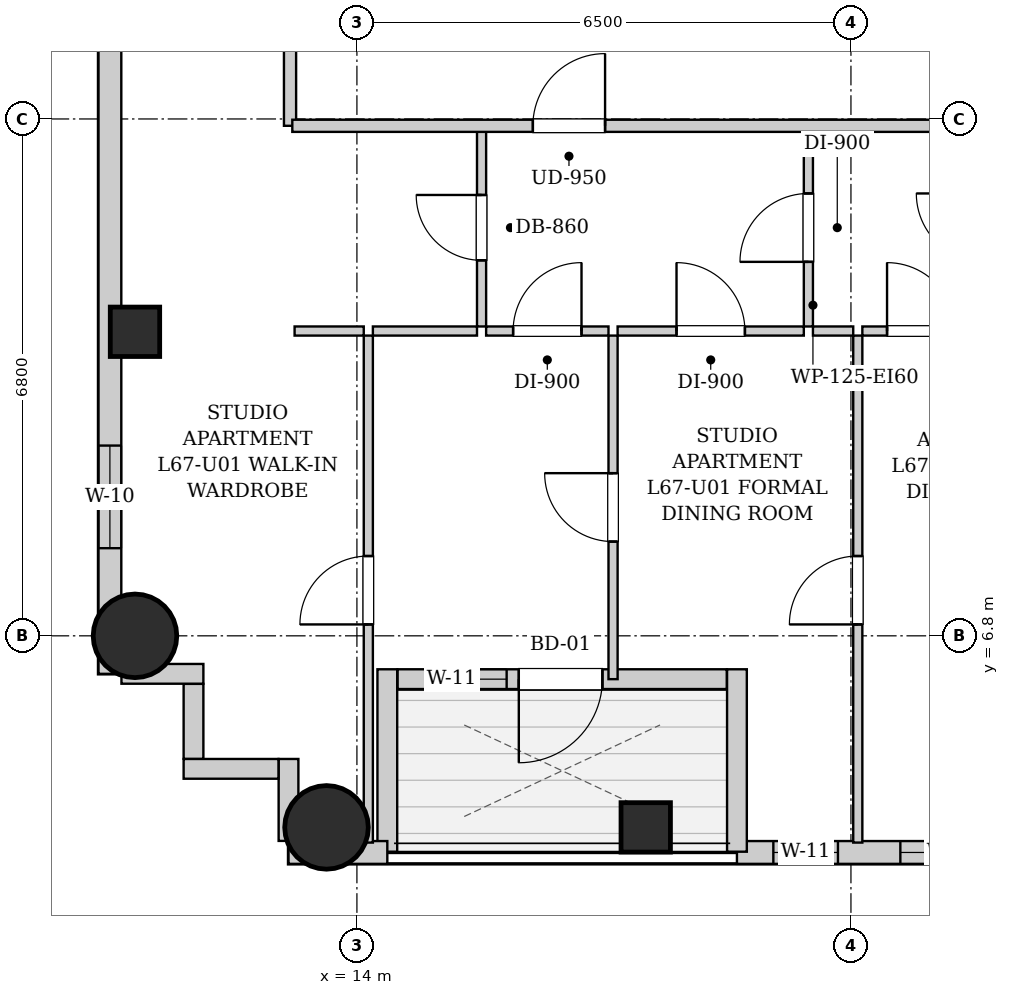
"""IFC4 building model, lengths in metres.
Left out: names, types, materials, properties, quantities, classifications, styles, units other than length and angle.
Written with IfcOpenShell. Run it as: python <this file> out.ifc"""

import sys

from ifc_helpers import new_model, si_unit, direction, frame, frame_2d, origin, origin_2d, place, context, subcontext, project, spatial, rectangle, circle, extrude, element, fill, save


model = new_model("IFC4")
c1 = context("Model", 3, precision=1e-05, world=origin(), true_north=direction((0.0, 1.0)))
c2 = subcontext(c1, "Body", "Model", "MODEL_VIEW")
j1 = project(units=[si_unit("LENGTHUNIT", "METRE"), si_unit("PLANEANGLEUNIT", "RADIAN")], contexts=[c1])
p1 = place(None, origin())
s1 = spatial("IfcSite", under=j1, at=p1, CompositionType="ELEMENT")
p2 = place(p1, origin())
s2 = spatial("IfcBuilding", under=s1, at=p2, CompositionType="ELEMENT")
p3 = place(p2, frame((0.0, 0.0, 230.9)))
s3 = spatial("IfcBuildingStorey", under=s2, at=p3, CompositionType="ELEMENT", Elevation=230.9)
p4 = place(p3, frame((13.6, 4.28, 0.0), z_axis=(0.0, 0.0, 1.0), x_axis=(1.0, 0.0, 0.0)))
e1 = element("IfcColumn", 1, at=p4, inside=s3, PredefinedType="COLUMN", context=c2, shape_type="SweptSolid", body=[
    extrude(circle(Radius=0.55, at=origin_2d()), origin(), (0.0, 0.0, 1.0), 3.4),
])
p5 = place(p3, frame((17.8, 4.28, 0.0), z_axis=(0.0, 0.0, 1.0), x_axis=(1.0, 0.0, 0.0)))
e2 = element("IfcColumn", 2, at=p5, inside=s3, PredefinedType="COLUMN", context=c2, shape_type="SweptSolid", body=[
    extrude(rectangle(XDim=0.65, YDim=0.65, at=origin_2d()), origin(), (0.0, 0.0, 1.0), 3.4),
])
p6 = place(p3, frame((11.08, 6.8, 0.0), z_axis=(0.0, 0.0, 1.0), x_axis=(1.0, 0.0, 0.0)))
e3 = element("IfcColumn", 3, at=p6, inside=s3, PredefinedType="COLUMN", context=c2, shape_type="SweptSolid", body=[
    extrude(circle(Radius=0.55, at=origin_2d()), origin(), (0.0, 0.0, 1.0), 3.4),
])
p7 = place(p3, frame((11.08, 10.8, 0.0), z_axis=(0.0, 0.0, 1.0), x_axis=(1.0, 0.0, 0.0)))
e4 = element("IfcColumn", 4, at=p7, inside=s3, PredefinedType="COLUMN", context=c2, shape_type="SweptSolid", body=[
    extrude(rectangle(XDim=0.65, YDim=0.65, at=origin_2d()), origin(), (0.0, 0.0, 1.0), 3.4),
])
p8 = place(p3, frame((31.5, 3.95, 0.0), z_axis=(0.0, 0.0, 1.0), x_axis=(-1.0, 0.0, 0.0)))
e5 = element("IfcWall", 5, at=p8, inside=s3, PredefinedType="SOLIDWALL", context=c2, shape_type="SweptSolid", body=[
    extrude(rectangle(XDim=12.5, YDim=0.3, at=frame_2d((6.25, 0.0))), origin(), (0.0, 0.0, 1.0), 3.14),
])
p9 = place(p8, frame((11.171, 0.0, 0.55)))
e6 = element("IfcOpeningElement", 6, at=p9, cuts=e5, PredefinedType="OPENING", context=c2, shape_type="SweptSolid", body=[
    extrude(rectangle(XDim=0.85, YDim=1.2, at=frame_2d((0.425, 0.6))), frame((0.0, 0.16, 0.0), z_axis=(0.0, -1.0, 0.0), x_axis=(1.0, 0.0, 0.0)), (0.0, 0.0, 1.0), 0.32),
])
p10 = place(p8, frame((9.0, 0.0, 0.55)))
e7 = element("IfcOpeningElement", 7, at=p10, cuts=e5, PredefinedType="OPENING", context=c2, shape_type="SweptSolid", body=[
    extrude(rectangle(XDim=1.35, YDim=1.2, at=frame_2d((0.675, 0.6))), frame((0.0, 0.16, 0.0), z_axis=(0.0, -1.0, 0.0), x_axis=(1.0, 0.0, 0.0)), (0.0, 0.0, 1.0), 0.32),
])
p11 = place(p8, frame((2.186, 0.0, 0.55)))
e8 = element("IfcOpeningElement", 8, at=p11, cuts=e5, PredefinedType="OPENING", context=c2, shape_type="SweptSolid", body=[
    extrude(rectangle(XDim=1.35, YDim=1.2, at=frame_2d((0.675, 0.6))), frame((0.0, 0.16, 0.0), z_axis=(0.0, -1.0, 0.0), x_axis=(1.0, 0.0, 0.0)), (0.0, 0.0, 1.0), 0.32),
])
p12 = place(p8, frame((0.35, 0.0, 0.55)))
e9 = element("IfcOpeningElement", 9, at=p12, cuts=e5, PredefinedType="OPENING", context=c2, shape_type="SweptSolid", body=[
    extrude(rectangle(XDim=0.68, YDim=1.2, at=frame_2d((0.34, 0.6))), frame((0.0, 0.16, 0.0), z_axis=(0.0, -1.0, 0.0), x_axis=(1.0, 0.0, 0.0)), (0.0, 0.0, 1.0), 0.32),
])
p13 = place(p3, frame((19.0, 3.96, 0.0), z_axis=(0.0, 0.0, 1.0), x_axis=(0.0, 1.0, 0.0)))
e10 = element("IfcWall", 10, at=p13, inside=s3, PredefinedType="SOLIDWALL", context=c2, shape_type="SweptSolid", body=[
    extrude(rectangle(XDim=2.4, YDim=0.26, at=frame_2d((1.2, 0.0))), origin(), (0.0, 0.0, 1.0), 3.14),
])
p14 = place(p3, frame((18.866, 6.23, 0.0), z_axis=(0.0, 0.0, 1.0), x_axis=(-1.0, 0.0, 0.0)))
e11 = element("IfcWall", 11, at=p14, inside=s3, PredefinedType="SOLIDWALL", context=c2, shape_type="SweptSolid", body=[
    extrude(rectangle(XDim=4.332, YDim=0.26, at=frame_2d((2.166, 0.0))), origin(), (0.0, 0.0, 1.0), 3.14),
])
p15 = place(p14, frame((1.636, 0.0, 0.0)))
e12 = element("IfcOpeningElement", 12, at=p15, cuts=e11, PredefinedType="OPENING", context=c2, shape_type="SweptSolid", body=[
    extrude(rectangle(XDim=1.1, YDim=2.0, at=frame_2d((0.55, 1.0))), frame((0.0, 0.14, 0.0), z_axis=(0.0, -1.0, 0.0), x_axis=(1.0, 0.0, 0.0)), (0.0, 0.0, 1.0), 0.28),
])
p16 = place(p14, frame((2.896, 0.0, 0.55)))
e13 = element("IfcOpeningElement", 13, at=p16, cuts=e11, PredefinedType="OPENING", context=c2, shape_type="SweptSolid", body=[
    extrude(rectangle(XDim=0.85, YDim=1.2, at=frame_2d((0.425, 0.6))), frame((0.0, 0.14, 0.0), z_axis=(0.0, -1.0, 0.0), x_axis=(1.0, 0.0, 0.0)), (0.0, 0.0, 1.0), 0.28),
])
p17 = place(p3, frame((14.4, 6.36, 0.0), z_axis=(0.0, 0.0, 1.0), x_axis=(0.0, -1.0, 0.0)))
e14 = element("IfcWall", 14, at=p17, inside=s3, PredefinedType="SOLIDWALL", context=c2, shape_type="SweptSolid", body=[
    extrude(rectangle(XDim=2.4, YDim=0.26, at=frame_2d((1.2, 0.0))), origin(), (0.0, 0.0, 1.0), 3.14),
])
p18 = place(p3, frame((14.4, 3.95, 0.0), z_axis=(0.0, 0.0, 1.0), x_axis=(-1.0, 0.0, 0.0)))
e15 = element("IfcWall", 15, at=p18, inside=s3, PredefinedType="SOLIDWALL", context=c2, shape_type="SweptSolid", body=[
    extrude(rectangle(XDim=1.3, YDim=0.3, at=frame_2d((0.65, 0.0))), origin(), (0.0, 0.0, 1.0), 3.14),
])
p19 = place(p3, frame((10.75, 6.3, 0.0), z_axis=(0.0, 0.0, 1.0), x_axis=(0.0, 1.0, 0.0)))
e16 = element("IfcWall", 16, at=p19, inside=s3, PredefinedType="SOLIDWALL", context=c2, shape_type="SweptSolid", body=[
    extrude(rectangle(XDim=31.4, YDim=0.3, at=frame_2d((15.7, 0.0))), origin(), (0.0, 0.0, 1.0), 3.14),
])
p20 = place(p19, frame((1.653, 0.0, 0.55)))
e17 = element("IfcOpeningElement", 17, at=p20, cuts=e16, PredefinedType="OPENING", context=c2, shape_type="SweptSolid", body=[
    extrude(rectangle(XDim=1.35, YDim=1.2, at=frame_2d((0.675, 0.6))), frame((0.0, 0.16, 0.0), z_axis=(0.0, -1.0, 0.0), x_axis=(1.0, 0.0, 0.0)), (0.0, 0.0, 1.0), 0.32),
])
p21 = place(p19, frame((10.367, 0.0, 0.55)))
e18 = element("IfcOpeningElement", 18, at=p21, cuts=e16, PredefinedType="OPENING", context=c2, shape_type="SweptSolid", body=[
    extrude(rectangle(XDim=1.35, YDim=1.2, at=frame_2d((0.675, 0.6))), frame((0.0, 0.16, 0.0), z_axis=(0.0, -1.0, 0.0), x_axis=(1.0, 0.0, 0.0)), (0.0, 0.0, 1.0), 0.32),
])
p22 = place(p19, frame((19.683, 0.0, 0.55)))
e19 = element("IfcOpeningElement", 19, at=p22, cuts=e16, PredefinedType="OPENING", context=c2, shape_type="SweptSolid", body=[
    extrude(rectangle(XDim=1.35, YDim=1.2, at=frame_2d((0.675, 0.6))), frame((0.0, 0.16, 0.0), z_axis=(0.0, -1.0, 0.0), x_axis=(1.0, 0.0, 0.0)), (0.0, 0.0, 1.0), 0.32),
])
p23 = place(p3, frame((13.1, 4.102, 0.0), z_axis=(0.0, 0.0, 1.0), x_axis=(0.0, 1.0, 0.0)))
e20 = element("IfcWall", 20, at=p23, inside=s3, PredefinedType="SOLIDWALL", context=c2, shape_type="SweptSolid", body=[
    extrude(rectangle(XDim=1.078, YDim=0.26, at=frame_2d((0.539, 0.0))), origin(), (0.0, 0.0, 1.0), 3.14),
])
p24 = place(p3, frame((12.968, 5.05, 0.0), z_axis=(0.0, 0.0, 1.0), x_axis=(-1.0, 0.0, 0.0)))
e21 = element("IfcWall", 21, at=p24, inside=s3, PredefinedType="SOLIDWALL", context=c2, shape_type="SweptSolid", body=[
    extrude(rectangle(XDim=1.248, YDim=0.26, at=frame_2d((0.624, 0.0))), origin(), (0.0, 0.0, 1.0), 3.14),
])
p25 = place(p3, frame((11.85, 5.182, 0.0), z_axis=(0.0, 0.0, 1.0), x_axis=(0.0, 1.0, 0.0)))
e22 = element("IfcWall", 22, at=p25, inside=s3, PredefinedType="SOLIDWALL", context=c2, shape_type="SweptSolid", body=[
    extrude(rectangle(XDim=0.986, YDim=0.26, at=frame_2d((0.493, 0.0))), origin(), (0.0, 0.0, 1.0), 3.14),
])
p26 = place(p3, frame((11.98, 6.3, 0.0), z_axis=(0.0, 0.0, 1.0), x_axis=(-1.0, 0.0, 0.0)))
e23 = element("IfcWall", 23, at=p26, inside=s3, PredefinedType="SOLIDWALL", context=c2, shape_type="SweptSolid", body=[
    extrude(rectangle(XDim=1.078, YDim=0.26, at=frame_2d((0.539, 0.0))), origin(), (0.0, 0.0, 1.0), 3.14),
])
p27 = place(p3, frame((13.12, 13.51, 0.0), z_axis=(0.0, 0.0, 1.0), x_axis=(0.0, 1.0, 0.0)))
e24 = element("IfcWall", 24, at=p27, inside=s3, PredefinedType="PARTITIONING", context=c2, shape_type="SweptSolid", body=[
    extrude(rectangle(XDim=1.58, YDim=0.16, at=frame_2d((0.79, 0.0))), origin(), (0.0, 0.0, 1.0), 3.14),
])
p28 = place(p3, frame((15.64, 10.87, 0.0), z_axis=(0.0, 0.0, 1.0), x_axis=(0.0, 1.0, 0.0)))
e25 = element("IfcWall", 25, at=p28, inside=s3, PredefinedType="PARTITIONING", context=c2, shape_type="SweptSolid", body=[
    extrude(rectangle(XDim=2.6, YDim=0.12, at=frame_2d((1.3, 0.0))), origin(), (0.0, 0.0, 1.0), 3.14),
])
p29 = place(p28, frame((0.87, 0.0, 0.0)))
e26 = element("IfcOpeningElement", 26, at=p29, cuts=e25, PredefinedType="OPENING", context=c2, shape_type="SweptSolid", body=[
    extrude(rectangle(XDim=0.86, YDim=2.05, at=frame_2d((0.43, 1.025))), frame((0.0, 0.07, 0.0), z_axis=(0.0, -1.0, 0.0), x_axis=(1.0, 0.0, 0.0)), (0.0, 0.0, 1.0), 0.14),
])
p30 = place(p3, frame((13.18, 10.81, 0.0), z_axis=(0.0, 0.0, 1.0), x_axis=(1.0, 0.0, 0.0)))
e27 = element("IfcWall", 27, at=p30, inside=s3, PredefinedType="PARTITIONING", context=c2, shape_type="SweptSolid", body=[
    extrude(rectangle(XDim=0.91, YDim=0.12, at=frame_2d((0.455, 0.0))), origin(), (0.0, 0.0, 1.0), 3.14),
])
p31 = place(p3, frame((14.21, 10.81, 0.0), z_axis=(0.0, 0.0, 1.0), x_axis=(1.0, 0.0, 0.0)))
e28 = element("IfcWall", 28, at=p31, inside=s3, PredefinedType="PARTITIONING", context=c2, shape_type="SweptSolid", body=[
    extrude(rectangle(XDim=1.37, YDim=0.12, at=frame_2d((0.685, 0.0))), origin(), (0.0, 0.0, 1.0), 3.14),
])
p32 = place(p3, frame((19.94, 10.87, 0.0), z_axis=(0.0, 0.0, 1.0), x_axis=(0.0, 1.0, 0.0)))
e29 = element("IfcWall", 29, at=p32, inside=s3, PredefinedType="PARTITIONING", context=c2, shape_type="SweptSolid", body=[
    extrude(rectangle(XDim=2.6, YDim=0.12, at=frame_2d((1.3, 0.0))), origin(), (0.0, 0.0, 1.0), 3.14),
])
p33 = place(p32, frame((0.85, 0.0, 0.0)))
e30 = element("IfcOpeningElement", 30, at=p33, cuts=e29, PredefinedType="OPENING", context=c2, shape_type="SweptSolid", body=[
    extrude(rectangle(XDim=0.9, YDim=2.05, at=frame_2d((0.45, 1.025))), frame((0.0, 0.07, 0.0), z_axis=(0.0, -1.0, 0.0), x_axis=(1.0, 0.0, 0.0)), (0.0, 0.0, 1.0), 0.14),
])
p34 = place(p3, frame((15.7, 10.81, 0.0), z_axis=(0.0, 0.0, 1.0), x_axis=(1.0, 0.0, 0.0)))
e31 = element("IfcWall", 31, at=p34, inside=s3, PredefinedType="PARTITIONING", context=c2, shape_type="SweptSolid", body=[
    extrude(rectangle(XDim=1.61, YDim=0.12, at=frame_2d((0.805, 0.0))), origin(), (0.0, 0.0, 1.0), 3.14),
])
p35 = place(p34, frame((0.355, 0.0, 0.0)))
e32 = element("IfcOpeningElement", 32, at=p35, cuts=e31, PredefinedType="OPENING", context=c2, shape_type="SweptSolid", body=[
    extrude(rectangle(XDim=0.9, YDim=2.05, at=frame_2d((0.45, 1.025))), frame((0.0, 0.07, 0.0), z_axis=(0.0, -1.0, 0.0), x_axis=(1.0, 0.0, 0.0)), (0.0, 0.0, 1.0), 0.14),
])
p36 = place(p3, frame((17.43, 10.81, 0.0), z_axis=(0.0, 0.0, 1.0), x_axis=(1.0, 0.0, 0.0)))
e33 = element("IfcWall", 33, at=p36, inside=s3, PredefinedType="PARTITIONING", context=c2, shape_type="SweptSolid", body=[
    extrude(rectangle(XDim=2.45, YDim=0.12, at=frame_2d((1.225, 0.0))), origin(), (0.0, 0.0, 1.0), 3.14),
])
p37 = place(p36, frame((0.775, 0.0, 0.0)))
e34 = element("IfcOpeningElement", 34, at=p37, cuts=e33, PredefinedType="OPENING", context=c2, shape_type="SweptSolid", body=[
    extrude(rectangle(XDim=0.9, YDim=2.05, at=frame_2d((0.45, 1.025))), frame((0.0, 0.07, 0.0), z_axis=(0.0, -1.0, 0.0), x_axis=(1.0, 0.0, 0.0)), (0.0, 0.0, 1.0), 0.14),
])
p38 = place(p3, frame((20.0, 10.81, 0.0), z_axis=(0.0, 0.0, 1.0), x_axis=(1.0, 0.0, 0.0)))
e35 = element("IfcWall", 35, at=p38, inside=s3, PredefinedType="PARTITIONING", context=c2, shape_type="SweptSolid", body=[
    extrude(rectangle(XDim=0.53, YDim=0.12, at=frame_2d((0.265, 0.0))), origin(), (0.0, 0.0, 1.0), 3.14),
])
p39 = place(p3, frame((20.65, 10.81, 0.0), z_axis=(0.0, 0.0, 1.0), x_axis=(1.0, 0.0, 0.0)))
e36 = element("IfcWall", 36, at=p39, inside=s3, PredefinedType="PARTITIONING", context=c2, shape_type="SweptSolid", body=[
    extrude(rectangle(XDim=1.55, YDim=0.12, at=frame_2d((0.775, 0.0))), origin(), (0.0, 0.0, 1.0), 3.14),
])
p40 = place(p39, frame((0.325, 0.0, 0.0)))
e37 = element("IfcOpeningElement", 37, at=p40, cuts=e36, PredefinedType="OPENING", context=c2, shape_type="SweptSolid", body=[
    extrude(rectangle(XDim=0.9, YDim=2.05, at=frame_2d((0.45, 1.025))), frame((0.0, 0.07, 0.0), z_axis=(0.0, -1.0, 0.0), x_axis=(1.0, 0.0, 0.0)), (0.0, 0.0, 1.0), 0.14),
])
p41 = place(p3, frame((14.15, 4.08, 0.0), z_axis=(0.0, 0.0, 1.0), x_axis=(0.0, 1.0, 0.0)))
e38 = element("IfcWall", 38, at=p41, inside=s3, PredefinedType="PARTITIONING", context=c2, shape_type="SweptSolid", body=[
    extrude(rectangle(XDim=6.67, YDim=0.12, at=frame_2d((3.335, 0.0))), origin(), (0.0, 0.0, 1.0), 3.14),
])
p42 = place(p41, frame((2.87, 0.0, 0.0)))
e39 = element("IfcOpeningElement", 39, at=p42, cuts=e38, PredefinedType="OPENING", context=c2, shape_type="SweptSolid", body=[
    extrude(rectangle(XDim=0.9, YDim=2.05, at=frame_2d((0.45, 1.025))), frame((0.0, 0.07, 0.0), z_axis=(0.0, -1.0, 0.0), x_axis=(1.0, 0.0, 0.0)), (0.0, 0.0, 1.0), 0.14),
])
p43 = place(p3, frame((17.37, 6.23, 0.0), z_axis=(0.0, 0.0, 1.0), x_axis=(0.0, 1.0, 0.0)))
e40 = element("IfcWall", 40, at=p43, inside=s3, PredefinedType="PARTITIONING", context=c2, shape_type="SweptSolid", body=[
    extrude(rectangle(XDim=4.52, YDim=0.12, at=frame_2d((2.26, 0.0))), origin(), (0.0, 0.0, 1.0), 3.14),
])
p44 = place(p43, frame((1.81, 0.0, 0.0)))
e41 = element("IfcOpeningElement", 41, at=p44, cuts=e40, PredefinedType="OPENING", context=c2, shape_type="SweptSolid", body=[
    extrude(rectangle(XDim=0.9, YDim=2.05, at=frame_2d((0.45, 1.025))), frame((0.0, 0.07, 0.0), z_axis=(0.0, -1.0, 0.0), x_axis=(1.0, 0.0, 0.0)), (0.0, 0.0, 1.0), 0.14),
])
p45 = place(p3, frame((20.59, 4.08, 0.0), z_axis=(0.0, 0.0, 1.0), x_axis=(0.0, 1.0, 0.0)))
e42 = element("IfcWall", 42, at=p45, inside=s3, PredefinedType="PARTITIONING", context=c2, shape_type="SweptSolid", body=[
    extrude(rectangle(XDim=6.67, YDim=0.12, at=frame_2d((3.335, 0.0))), origin(), (0.0, 0.0, 1.0), 3.14),
])
p46 = place(p45, frame((2.87, 0.0, 0.0)))
e43 = element("IfcOpeningElement", 43, at=p46, cuts=e42, PredefinedType="OPENING", context=c2, shape_type="SweptSolid", body=[
    extrude(rectangle(XDim=0.9, YDim=2.05, at=frame_2d((0.45, 1.025))), frame((0.0, 0.07, 0.0), z_axis=(0.0, -1.0, 0.0), x_axis=(1.0, 0.0, 0.0)), (0.0, 0.0, 1.0), 0.14),
])
p47 = place(p3, frame((13.15, 13.51, 0.0), z_axis=(0.0, 0.0, 1.0), x_axis=(1.0, 0.0, 0.0)))
e44 = element("IfcWall", 44, at=p47, inside=s3, PredefinedType="PARTITIONING", context=c2, shape_type="SweptSolid", body=[
    extrude(rectangle(XDim=24.6, YDim=0.16, at=frame_2d((12.3, 0.0))), origin(), (0.0, 0.0, 1.0), 3.14),
])
p48 = place(p47, frame((3.165, 0.0, 0.0)))
e45 = element("IfcOpeningElement", 45, at=p48, cuts=e44, PredefinedType="OPENING", context=c2, shape_type="SweptSolid", body=[
    extrude(rectangle(XDim=0.95, YDim=2.1, at=frame_2d((0.475, 1.05))), frame((0.0, 0.09, 0.0), z_axis=(0.0, -1.0, 0.0), x_axis=(1.0, 0.0, 0.0)), (0.0, 0.0, 1.0), 0.18),
])
p49 = place(p29, origin())
e46 = element("IfcDoor", 46, at=p49, inside=s3, OperationType="SINGLE_SWING_RIGHT", PredefinedType="DOOR", context=c2, shape_type="SweptSolid", body=[
    extrude(rectangle(XDim=0.86, YDim=2.05, at=frame_2d((0.43, 1.025))), frame((0.0, 0.025, 0.0), z_axis=(0.0, -1.0, 0.0), x_axis=(1.0, 0.0, 0.0)), (0.0, 0.0, 1.0), 0.05),
])
fill(e26, e46)
p50 = place(p33, origin())
e47 = element("IfcDoor", 47, at=p50, inside=s3, OperationType="SINGLE_SWING_LEFT", PredefinedType="DOOR", context=c2, shape_type="SweptSolid", body=[
    extrude(rectangle(XDim=0.9, YDim=2.05, at=frame_2d((0.45, 1.025))), frame((0.0, 0.025, 0.0), z_axis=(0.0, -1.0, 0.0), x_axis=(1.0, 0.0, 0.0)), (0.0, 0.0, 1.0), 0.05),
])
fill(e30, e47)
p51 = place(p35, origin())
e48 = element("IfcDoor", 48, at=p51, inside=s3, OperationType="SINGLE_SWING_RIGHT", PredefinedType="DOOR", context=c2, shape_type="SweptSolid", body=[
    extrude(rectangle(XDim=0.9, YDim=2.05, at=frame_2d((0.45, 1.025))), frame((0.0, 0.025, 0.0), z_axis=(0.0, -1.0, 0.0), x_axis=(1.0, 0.0, 0.0)), (0.0, 0.0, 1.0), 0.05),
])
fill(e32, e48)
p52 = place(p37, origin())
e49 = element("IfcDoor", 49, at=p52, inside=s3, OperationType="SINGLE_SWING_LEFT", PredefinedType="DOOR", context=c2, shape_type="SweptSolid", body=[
    extrude(rectangle(XDim=0.9, YDim=2.05, at=frame_2d((0.45, 1.025))), frame((0.0, 0.025, 0.0), z_axis=(0.0, -1.0, 0.0), x_axis=(1.0, 0.0, 0.0)), (0.0, 0.0, 1.0), 0.05),
])
fill(e34, e49)
p53 = place(p40, origin())
e50 = element("IfcDoor", 50, at=p53, inside=s3, OperationType="SINGLE_SWING_LEFT", PredefinedType="DOOR", context=c2, shape_type="SweptSolid", body=[
    extrude(rectangle(XDim=0.9, YDim=2.05, at=frame_2d((0.45, 1.025))), frame((0.0, 0.025, 0.0), z_axis=(0.0, -1.0, 0.0), x_axis=(1.0, 0.0, 0.0)), (0.0, 0.0, 1.0), 0.05),
])
fill(e37, e50)
p54 = place(p42, origin())
e51 = element("IfcDoor", 51, at=p54, inside=s3, OperationType="SINGLE_SWING_LEFT", PredefinedType="DOOR", context=c2, shape_type="SweptSolid", body=[
    extrude(rectangle(XDim=0.9, YDim=2.05, at=frame_2d((0.45, 1.025))), frame((0.0, 0.025, 0.0), z_axis=(0.0, -1.0, 0.0), x_axis=(1.0, 0.0, 0.0)), (0.0, 0.0, 1.0), 0.05),
])
fill(e39, e51)
p55 = place(p44, origin())
e52 = element("IfcDoor", 52, at=p55, inside=s3, OperationType="SINGLE_SWING_RIGHT", PredefinedType="DOOR", context=c2, shape_type="SweptSolid", body=[
    extrude(rectangle(XDim=0.9, YDim=2.05, at=frame_2d((0.45, 1.025))), frame((0.0, 0.025, 0.0), z_axis=(0.0, -1.0, 0.0), x_axis=(1.0, 0.0, 0.0)), (0.0, 0.0, 1.0), 0.05),
])
fill(e41, e52)
p56 = place(p46, origin())
e53 = element("IfcDoor", 53, at=p56, inside=s3, OperationType="SINGLE_SWING_LEFT", PredefinedType="DOOR", context=c2, shape_type="SweptSolid", body=[
    extrude(rectangle(XDim=0.9, YDim=2.05, at=frame_2d((0.45, 1.025))), frame((0.0, 0.025, 0.0), z_axis=(0.0, -1.0, 0.0), x_axis=(1.0, 0.0, 0.0)), (0.0, 0.0, 1.0), 0.05),
])
fill(e43, e53)
p57 = place(p48, origin())
e54 = element("IfcDoor", 54, at=p57, inside=s3, OperationType="SINGLE_SWING_RIGHT", PredefinedType="DOOR", context=c2, shape_type="SweptSolid", body=[
    extrude(rectangle(XDim=0.95, YDim=2.1, at=frame_2d((0.475, 1.05))), frame((0.0, 0.025, 0.0), z_axis=(0.0, -1.0, 0.0), x_axis=(1.0, 0.0, 0.0)), (0.0, 0.0, 1.0), 0.05),
])
fill(e45, e54)
p58 = place(p15, origin())
e55 = element("IfcDoor", 55, at=p58, inside=s3, OperationType="SINGLE_SWING_RIGHT", PredefinedType="DOOR", context=c2, shape_type="SweptSolid", body=[
    extrude(rectangle(XDim=1.1, YDim=2.0, at=frame_2d((0.55, 1.0))), frame((0.0, 0.025, 0.0), z_axis=(0.0, -1.0, 0.0), x_axis=(1.0, 0.0, 0.0)), (0.0, 0.0, 1.0), 0.05),
])
fill(e12, e55)
p59 = place(p20, origin())
e56 = element("IfcWindow", 56, at=p59, inside=s3, PartitioningType="SINGLE_PANEL", PredefinedType="WINDOW", context=c2, shape_type="SweptSolid", body=[
    extrude(rectangle(XDim=1.35, YDim=1.2, at=frame_2d((0.675, 0.6))), frame((0.0, 0.03, 0.0), z_axis=(0.0, -1.0, 0.0), x_axis=(1.0, 0.0, 0.0)), (0.0, 0.0, 1.0), 0.06),
])
fill(e17, e56)
p60 = place(p16, origin())
e57 = element("IfcWindow", 57, at=p60, inside=s3, PartitioningType="SINGLE_PANEL", PredefinedType="WINDOW", context=c2, shape_type="SweptSolid", body=[
    extrude(rectangle(XDim=0.85, YDim=1.2, at=frame_2d((0.425, 0.6))), frame((0.0, 0.03, 0.0), z_axis=(0.0, -1.0, 0.0), x_axis=(1.0, 0.0, 0.0)), (0.0, 0.0, 1.0), 0.06),
])
fill(e13, e57)
p61 = place(p9, origin())
e58 = element("IfcWindow", 58, at=p61, inside=s3, PartitioningType="SINGLE_PANEL", PredefinedType="WINDOW", context=c2, shape_type="SweptSolid", body=[
    extrude(rectangle(XDim=0.85, YDim=1.2, at=frame_2d((0.425, 0.6))), frame((0.0, 0.03, 0.0), z_axis=(0.0, -1.0, 0.0), x_axis=(1.0, 0.0, 0.0)), (0.0, 0.0, 1.0), 0.06),
])
fill(e6, e58)
p62 = place(p10, origin())
e59 = element("IfcWindow", 59, at=p62, inside=s3, PartitioningType="SINGLE_PANEL", PredefinedType="WINDOW", context=c2, shape_type="SweptSolid", body=[
    extrude(rectangle(XDim=1.35, YDim=1.2, at=frame_2d((0.675, 0.6))), frame((0.0, 0.03, 0.0), z_axis=(0.0, -1.0, 0.0), x_axis=(1.0, 0.0, 0.0)), (0.0, 0.0, 1.0), 0.06),
])
fill(e7, e59)
save(model, sys.argv[1])
